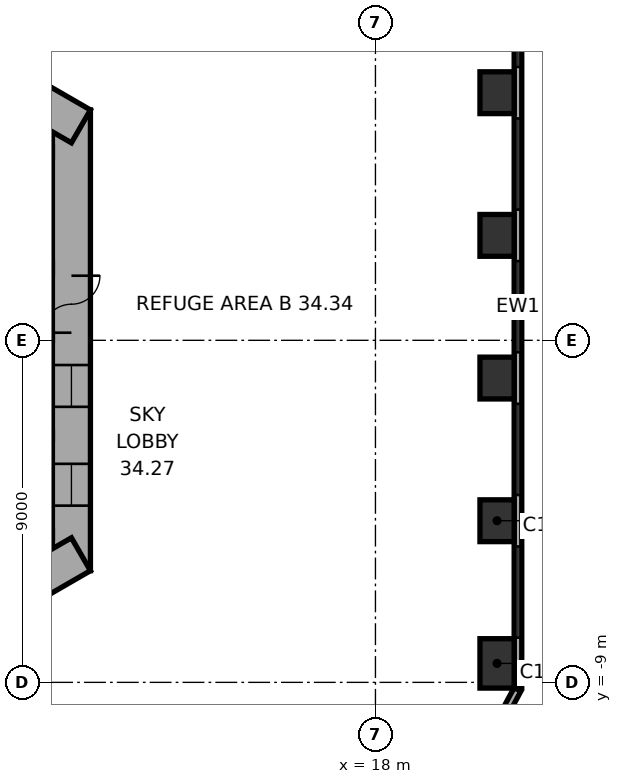
"""IFC4 building model, lengths in metres.
Left out: names, types, materials, properties, quantities, classifications, styles, units other than length and angle.
Written with IfcOpenShell. Run it as: python <this file> out.ifc"""

import sys

from ifc_helpers import new_model, si_unit, direction, frame, frame_2d, origin, origin_2d, place, context, subcontext, project, spatial, rectangle, extrude, element, fill, save


model = new_model("IFC4")
c1 = context("Model", 3, precision=1e-05, world=origin(), true_north=direction((0.0, 1.0)))
c2 = subcontext(c1, "Body", "Model", "MODEL_VIEW")
j1 = project(units=[si_unit("LENGTHUNIT", "METRE"), si_unit("PLANEANGLEUNIT", "RADIAN")], contexts=[c1])
p1 = place(None, origin())
s1 = spatial("IfcSite", under=j1, at=p1, CompositionType="ELEMENT")
p2 = place(p1, origin())
s2 = spatial("IfcBuilding", under=s1, at=p2, CompositionType="ELEMENT")
p3 = place(p2, frame((0.0, 0.0, 139.2)))
s3 = spatial("IfcBuildingStorey", under=s2, at=p3, CompositionType="ELEMENT", Elevation=139.2)
p4 = place(p3, frame((21.2, -8.501, 0.0), z_axis=(0.0, 0.0, 1.0), x_axis=(0.0, 1.0, 0.0)))
e1 = element("IfcColumn", 1, at=p4, inside=s3, PredefinedType="COLUMN", context=c2, shape_type="SweptSolid", body=[
    extrude(rectangle(XDim=1.3, YDim=0.9, at=origin_2d()), origin(), (0.0, 0.0, 1.0), 7.4),
])
for number, where, z_axis, x_axis in (
    (2, (21.2, -4.747, 0.0), (0.0, 0.0, 1.0), (0.0, 1.0, 0.0)),
    (3, (21.2, -0.993, 0.0), (0.0, 0.0, 1.0), (0.0, 1.0, 0.0)),
    (4, (21.2, 2.761, 0.0), (0.0, 0.0, 1.0), (0.0, 1.0, 0.0)),
    (5, (21.2, 6.515, 0.0), (0.0, 0.0, 1.0), (0.0, 1.0, 0.0)),
):
    element("IfcColumn", number, at=place(p3, frame(where, z_axis=z_axis, x_axis=x_axis)), inside=s3, PredefinedType="COLUMN", context=c2, shape_type="SweptSolid", body=[
        extrude(rectangle(XDim=1.1, YDim=0.9, at=origin_2d()), origin(), (0.0, 0.0, 1.0), 7.4),
    ])
p5 = place(p3, frame((10.0, -6.062, 0.0), z_axis=(0.0, 0.0, 1.0), x_axis=(0.0, 1.0, 0.0)))
e6 = element("IfcWall", 6, at=p5, inside=s3, PredefinedType="SHEAR", context=c2, shape_type="SweptSolid", body=[
    extrude(rectangle(XDim=12.125, YDim=1.0, at=frame_2d((6.062, 0.0))), origin(), (0.0, 0.0, 1.0), 7.4),
])
p6 = place(p5, frame((6.262, 0.0, 0.0)))
e7 = element("IfcOpeningElement", 7, at=p6, cuts=e6, PredefinedType="OPENING", context=c2, shape_type="SweptSolid", body=[
    extrude(rectangle(XDim=1.5, YDim=2.1, at=frame_2d((0.75, 1.05))), frame((0.0, 0.51, 0.0), z_axis=(0.0, -1.0, 0.0), x_axis=(1.0, 0.0, 0.0)), (0.0, 0.0, 1.0), 1.02),
])
p7 = place(p5, frame((1.712, 0.0, 0.0)))
e8 = element("IfcOpeningElement", 8, at=p7, cuts=e6, PredefinedType="OPENING", context=c2, shape_type="SweptSolid", body=[
    extrude(rectangle(XDim=1.1, YDim=2.1, at=frame_2d((0.55, 1.05))), frame((0.0, 0.51, 0.0), z_axis=(0.0, -1.0, 0.0), x_axis=(1.0, 0.0, 0.0)), (0.0, 0.0, 1.0), 1.02),
])
p8 = place(p5, frame((4.312, 0.0, 0.0)))
e9 = element("IfcOpeningElement", 9, at=p8, cuts=e6, PredefinedType="OPENING", context=c2, shape_type="SweptSolid", body=[
    extrude(rectangle(XDim=1.1, YDim=2.1, at=frame_2d((0.55, 1.05))), frame((0.0, 0.51, 0.0), z_axis=(0.0, -1.0, 0.0), x_axis=(1.0, 0.0, 0.0)), (0.0, 0.0, 1.0), 1.02),
])
p9 = place(p3, frame((10.25, 5.629, 0.0), z_axis=(0.0, 0.0, 1.0), x_axis=(-0.866022616891, 0.50000482701, 0.0)))
e10 = element("IfcWall", 10, at=p9, inside=s3, PredefinedType="SHEAR", context=c2, shape_type="SweptSolid", body=[
    extrude(rectangle(XDim=12.125, YDim=1.0, at=frame_2d((6.062, 0.0))), origin(), (0.0, 0.0, 1.0), 7.4),
])
p10 = place(p9, frame((2.612, 0.0, 0.0)))
e11 = element("IfcOpeningElement", 11, at=p10, cuts=e10, PredefinedType="OPENING", context=c2, shape_type="SweptSolid", body=[
    extrude(rectangle(XDim=1.1, YDim=2.1, at=frame_2d((0.55, 1.05))), frame((0.0, 0.51, 0.0), z_axis=(0.0, -1.0, 0.0), x_axis=(1.0, 0.0, 0.0)), (0.0, 0.0, 1.0), 1.02),
])
p11 = place(p9, frame((5.212, 0.0, 0.0)))
e12 = element("IfcOpeningElement", 12, at=p11, cuts=e10, PredefinedType="OPENING", context=c2, shape_type="SweptSolid", body=[
    extrude(rectangle(XDim=1.1, YDim=2.1, at=frame_2d((0.55, 1.05))), frame((0.0, 0.51, 0.0), z_axis=(0.0, -1.0, 0.0), x_axis=(1.0, 0.0, 0.0)), (0.0, 0.0, 1.0), 1.02),
])
p12 = place(p9, frame((7.812, 0.0, 0.0)))
e13 = element("IfcOpeningElement", 13, at=p12, cuts=e10, PredefinedType="OPENING", context=c2, shape_type="SweptSolid", body=[
    extrude(rectangle(XDim=1.1, YDim=2.1, at=frame_2d((0.55, 1.05))), frame((0.0, 0.51, 0.0), z_axis=(0.0, -1.0, 0.0), x_axis=(1.0, 0.0, 0.0)), (0.0, 0.0, 1.0), 1.02),
])
p13 = place(p3, frame((-0.25, -11.691, 0.0), z_axis=(0.0, 0.0, 1.0), x_axis=(0.866022616891, 0.50000482701, 0.0)))
e14 = element("IfcWall", 14, at=p13, inside=s3, PredefinedType="SHEAR", context=c2, shape_type="SweptSolid", body=[
    extrude(rectangle(XDim=12.125, YDim=1.0, at=frame_2d((6.062, 0.0))), origin(), (0.0, 0.0, 1.0), 7.4),
])
p14 = place(p13, frame((2.612, 0.0, 0.0)))
e15 = element("IfcOpeningElement", 15, at=p14, cuts=e14, PredefinedType="OPENING", context=c2, shape_type="SweptSolid", body=[
    extrude(rectangle(XDim=1.1, YDim=2.1, at=frame_2d((0.55, 1.05))), frame((0.0, 0.51, 0.0), z_axis=(0.0, -1.0, 0.0), x_axis=(1.0, 0.0, 0.0)), (0.0, 0.0, 1.0), 1.02),
])
p15 = place(p13, frame((5.212, 0.0, 0.0)))
e16 = element("IfcOpeningElement", 16, at=p15, cuts=e14, PredefinedType="OPENING", context=c2, shape_type="SweptSolid", body=[
    extrude(rectangle(XDim=1.1, YDim=2.1, at=frame_2d((0.55, 1.05))), frame((0.0, 0.51, 0.0), z_axis=(0.0, -1.0, 0.0), x_axis=(1.0, 0.0, 0.0)), (0.0, 0.0, 1.0), 1.02),
])
p16 = place(p13, frame((7.812, 0.0, 0.0)))
e17 = element("IfcOpeningElement", 17, at=p16, cuts=e14, PredefinedType="OPENING", context=c2, shape_type="SweptSolid", body=[
    extrude(rectangle(XDim=1.1, YDim=2.1, at=frame_2d((0.55, 1.05))), frame((0.0, 0.51, 0.0), z_axis=(0.0, -1.0, 0.0), x_axis=(1.0, 0.0, 0.0)), (0.0, 0.0, 1.0), 1.02),
])
p17 = place(p3, frame((21.75, -9.138, 0.0), z_axis=(0.0, 0.0, 1.0), x_axis=(0.0, 1.0, 0.0)))
e18 = element("IfcWall", 18, at=p17, inside=s3, PredefinedType="STANDARD", context=c2, shape_type="SweptSolid", body=[
    extrude(rectangle(XDim=20.044, YDim=0.2, at=frame_2d((10.022, 0.0))), origin(), (0.0, 0.0, 1.0), 7.4),
])
p18 = place(p17, frame((1.314, 0.0, 0.8)))
e19 = element("IfcOpeningElement", 19, at=p18, cuts=e18, PredefinedType="OPENING", context=c2, shape_type="SweptSolid", body=[
    extrude(rectangle(XDim=2.4, YDim=4.2, at=frame_2d((1.2, 2.1))), frame((0.0, 0.11, 0.0), z_axis=(0.0, -1.0, 0.0), x_axis=(1.0, 0.0, 0.0)), (0.0, 0.0, 1.0), 0.22),
])
p19 = place(p17, frame((5.069, 0.0, 0.8)))
e20 = element("IfcOpeningElement", 20, at=p19, cuts=e18, PredefinedType="OPENING", context=c2, shape_type="SweptSolid", body=[
    extrude(rectangle(XDim=2.4, YDim=4.2, at=frame_2d((1.2, 2.1))), frame((0.0, 0.11, 0.0), z_axis=(0.0, -1.0, 0.0), x_axis=(1.0, 0.0, 0.0)), (0.0, 0.0, 1.0), 0.22),
])
p20 = place(p17, frame((8.823, 0.0, 0.8)))
e21 = element("IfcOpeningElement", 21, at=p20, cuts=e18, PredefinedType="OPENING", context=c2, shape_type="SweptSolid", body=[
    extrude(rectangle(XDim=2.4, YDim=4.2, at=frame_2d((1.2, 2.1))), frame((0.0, 0.11, 0.0), z_axis=(0.0, -1.0, 0.0), x_axis=(1.0, 0.0, 0.0)), (0.0, 0.0, 1.0), 0.22),
])
p21 = place(p17, frame((12.577, 0.0, 0.8)))
e22 = element("IfcOpeningElement", 22, at=p21, cuts=e18, PredefinedType="OPENING", context=c2, shape_type="SweptSolid", body=[
    extrude(rectangle(XDim=2.4, YDim=4.2, at=frame_2d((1.2, 2.1))), frame((0.0, 0.11, 0.0), z_axis=(0.0, -1.0, 0.0), x_axis=(1.0, 0.0, 0.0)), (0.0, 0.0, 1.0), 0.22),
])
p22 = place(p17, frame((16.331, 0.0, 0.8)))
e23 = element("IfcOpeningElement", 23, at=p22, cuts=e18, PredefinedType="OPENING", context=c2, shape_type="SweptSolid", body=[
    extrude(rectangle(XDim=2.4, YDim=4.2, at=frame_2d((1.2, 2.1))), frame((0.0, 0.11, 0.0), z_axis=(0.0, -1.0, 0.0), x_axis=(1.0, 0.0, 0.0)), (0.0, 0.0, 1.0), 0.22),
])
p23 = place(p3, frame((19.658, -13.057, 0.0), z_axis=(0.0, 0.0, 1.0), x_axis=(0.473307879841, 0.880897071672, 0.0)))
e24 = element("IfcWall", 24, at=p23, inside=s3, PredefinedType="STANDARD", context=c2, shape_type="SweptSolid", body=[
    extrude(rectangle(XDim=4.395, YDim=0.2, at=frame_2d((2.197, 0.0))), origin(), (0.0, 0.0, 1.0), 7.4),
])
p24 = place(p23, frame((0.698, 0.0, 0.8)))
e25 = element("IfcOpeningElement", 25, at=p24, cuts=e24, PredefinedType="OPENING", context=c2, shape_type="SweptSolid", body=[
    extrude(rectangle(XDim=3.0, YDim=4.2, at=frame_2d((1.5, 2.1))), frame((0.0, 0.11, 0.0), z_axis=(0.0, -1.0, 0.0), x_axis=(1.0, 0.0, 0.0)), (0.0, 0.0, 1.0), 0.22),
])
for number, where, z_axis, x_axis in (
    (26, (7.3, -5.1, 0.0), (0.0, 0.0, 1.0), (1.0, 0.0, 0.0)),
    (27, (7.3, -2.5, 0.0), (0.0, 0.0, 1.0), (1.0, 0.0, 0.0)),
    (28, (7.3, 0.1, 0.0), (0.0, 0.0, 1.0), (1.0, 0.0, 0.0)),
):
    element("IfcWall", number, at=place(p3, frame(where, z_axis=z_axis, x_axis=x_axis)), inside=s3, PredefinedType="PARTITIONING", context=c2, shape_type="SweptSolid", body=[
        extrude(rectangle(XDim=2.2, YDim=0.2, at=frame_2d((1.1, 0.0))), origin(), (0.0, 0.0, 1.0), 7.12),
    ])
p25 = place(p3, frame((7.3, 1.9, 0.0), z_axis=(0.0, 0.0, 1.0), x_axis=(1.0, 0.0, 0.0)))
e29 = element("IfcWall", 29, at=p25, inside=s3, PredefinedType="SHEAR", context=c2, shape_type="SweptSolid", body=[
    extrude(rectangle(XDim=2.2, YDim=0.3, at=frame_2d((1.1, 0.0))), origin(), (0.0, 0.0, 1.0), 7.12),
])
p26 = place(p25, frame((0.7, 0.0, 0.0)))
e30 = element("IfcOpeningElement", 30, at=p26, cuts=e29, PredefinedType="OPENING", context=c2, shape_type="SweptSolid", body=[
    extrude(rectangle(XDim=1.1, YDim=2.1, at=frame_2d((0.55, 1.05))), frame((0.0, 0.16, 0.0), z_axis=(0.0, -1.0, 0.0), x_axis=(1.0, 0.0, 0.0)), (0.0, 0.0, 1.0), 0.32),
])
p27 = place(p3, frame((7.3, 4.95, 0.0), z_axis=(0.0, 0.0, 1.0), x_axis=(1.0, 0.0, 0.0)))
e31 = element("IfcWall", 31, at=p27, inside=s3, PredefinedType="SHEAR", context=c2, shape_type="SweptSolid", body=[
    extrude(rectangle(XDim=2.2, YDim=0.3, at=frame_2d((1.1, 0.0))), origin(), (0.0, 0.0, 1.0), 7.12),
])
p28 = place(p18, origin())
e32 = element("IfcWindow", 32, at=p28, inside=s3, PartitioningType="SINGLE_PANEL", PredefinedType="WINDOW", context=c2, shape_type="SweptSolid", body=[
    extrude(rectangle(XDim=2.4, YDim=4.2, at=frame_2d((1.2, 2.1))), frame((0.0, 0.03, 0.0), z_axis=(0.0, -1.0, 0.0), x_axis=(1.0, 0.0, 0.0)), (0.0, 0.0, 1.0), 0.06),
])
fill(e19, e32)
p29 = place(p19, origin())
e33 = element("IfcWindow", 33, at=p29, inside=s3, PartitioningType="SINGLE_PANEL", PredefinedType="WINDOW", context=c2, shape_type="SweptSolid", body=[
    extrude(rectangle(XDim=2.4, YDim=4.2, at=frame_2d((1.2, 2.1))), frame((0.0, 0.03, 0.0), z_axis=(0.0, -1.0, 0.0), x_axis=(1.0, 0.0, 0.0)), (0.0, 0.0, 1.0), 0.06),
])
fill(e20, e33)
p30 = place(p20, origin())
e34 = element("IfcWindow", 34, at=p30, inside=s3, PartitioningType="SINGLE_PANEL", PredefinedType="WINDOW", context=c2, shape_type="SweptSolid", body=[
    extrude(rectangle(XDim=2.4, YDim=4.2, at=frame_2d((1.2, 2.1))), frame((0.0, 0.03, 0.0), z_axis=(0.0, -1.0, 0.0), x_axis=(1.0, 0.0, 0.0)), (0.0, 0.0, 1.0), 0.06),
])
fill(e21, e34)
p31 = place(p21, origin())
e35 = element("IfcWindow", 35, at=p31, inside=s3, PartitioningType="SINGLE_PANEL", PredefinedType="WINDOW", context=c2, shape_type="SweptSolid", body=[
    extrude(rectangle(XDim=2.4, YDim=4.2, at=frame_2d((1.2, 2.1))), frame((0.0, 0.03, 0.0), z_axis=(0.0, -1.0, 0.0), x_axis=(1.0, 0.0, 0.0)), (0.0, 0.0, 1.0), 0.06),
])
fill(e22, e35)
p32 = place(p22, origin())
e36 = element("IfcWindow", 36, at=p32, inside=s3, PartitioningType="SINGLE_PANEL", PredefinedType="WINDOW", context=c2, shape_type="SweptSolid", body=[
    extrude(rectangle(XDim=2.4, YDim=4.2, at=frame_2d((1.2, 2.1))), frame((0.0, 0.03, 0.0), z_axis=(0.0, -1.0, 0.0), x_axis=(1.0, 0.0, 0.0)), (0.0, 0.0, 1.0), 0.06),
])
fill(e23, e36)
p33 = place(p6, origin())
e37 = element("IfcDoor", 37, at=p33, inside=s3, OperationType="DOUBLE_DOOR_SINGLE_SWING", PredefinedType="DOOR", context=c2, shape_type="SweptSolid", body=[
    extrude(rectangle(XDim=1.5, YDim=2.1, at=frame_2d((0.75, 1.05))), frame((0.0, 0.025, 0.0), z_axis=(0.0, -1.0, 0.0), x_axis=(1.0, 0.0, 0.0)), (0.0, 0.0, 1.0), 0.05),
])
fill(e7, e37)
p34 = place(p7, origin())
e38 = element("IfcDoor", 38, at=p34, inside=s3, OperationType="DOUBLE_DOOR_SLIDING", PredefinedType="DOOR", context=c2, shape_type="SweptSolid", body=[
    extrude(rectangle(XDim=1.1, YDim=2.1, at=frame_2d((0.55, 1.05))), frame((0.0, 0.025, 0.0), z_axis=(0.0, -1.0, 0.0), x_axis=(1.0, 0.0, 0.0)), (0.0, 0.0, 1.0), 0.05),
])
fill(e8, e38)
p35 = place(p8, origin())
e39 = element("IfcDoor", 39, at=p35, inside=s3, OperationType="DOUBLE_DOOR_SLIDING", PredefinedType="DOOR", context=c2, shape_type="SweptSolid", body=[
    extrude(rectangle(XDim=1.1, YDim=2.1, at=frame_2d((0.55, 1.05))), frame((0.0, 0.025, 0.0), z_axis=(0.0, -1.0, 0.0), x_axis=(1.0, 0.0, 0.0)), (0.0, 0.0, 1.0), 0.05),
])
fill(e9, e39)
save(model, sys.argv[1])
